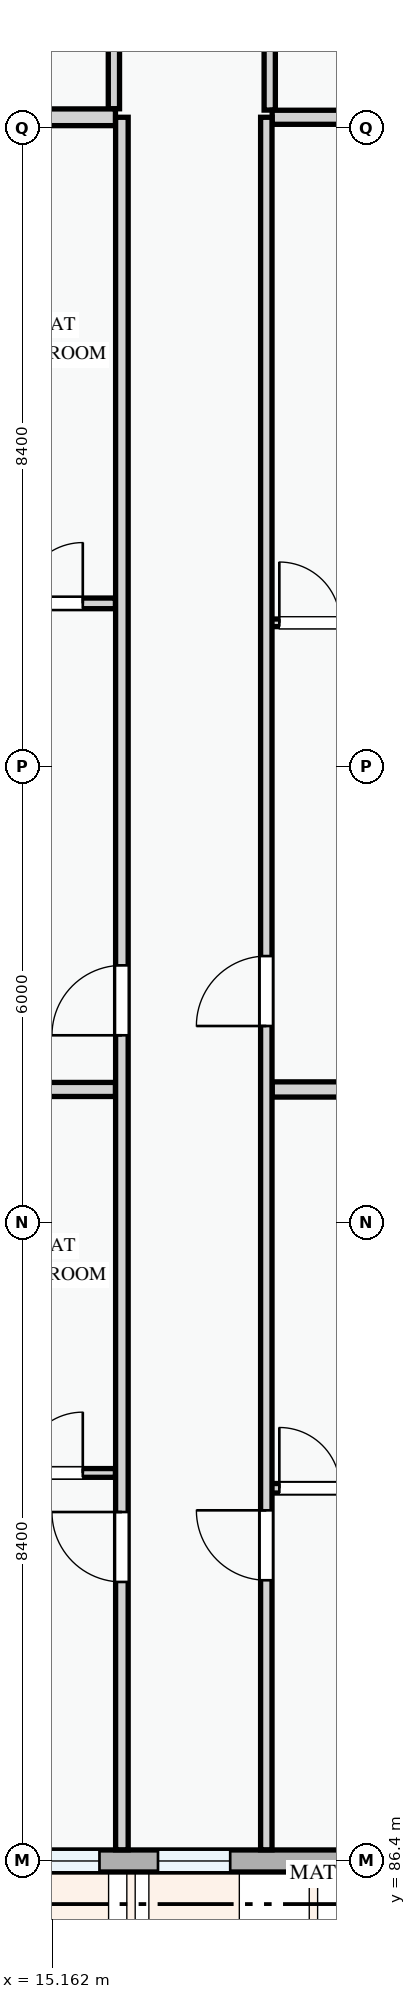
"""IFC4 building model, lengths in metres.
Left out: names, types, materials, properties, quantities, classifications, styles, units other than length and angle.
Written with IfcOpenShell. Run it as: python <this file> out.ifc"""

import sys

from ifc_helpers import new_model, si_unit, direction, frame, frame_2d, origin, place, context, subcontext, project, spatial, rectangle, extrude, element, fill, save


model = new_model("IFC4")
c1 = context("Model", 3, precision=1e-05, world=origin(), true_north=direction((0.0, 1.0)))
c2 = subcontext(c1, "Body", "Model", "MODEL_VIEW")
j1 = project(units=[si_unit("LENGTHUNIT", "METRE"), si_unit("PLANEANGLEUNIT", "RADIAN")], contexts=[c1])
p1 = place(None, origin())
s1 = spatial("IfcSite", under=j1, at=p1, CompositionType="ELEMENT")
p2 = place(p1, origin())
s2 = spatial("IfcBuilding", under=s1, at=p2, CompositionType="ELEMENT")
p3 = place(p2, frame((0.0, 0.0, 27.9)))
s3 = spatial("IfcBuildingStorey", under=s2, at=p3, CompositionType="ELEMENT", Elevation=27.9)
p4 = place(p3, frame((14.4, 86.4, 0.0), z_axis=(0.0, 0.0, 1.0), x_axis=(1.0, 0.0, 0.0)))
e1 = element("IfcWall", 1, at=p4, inside=s3, PredefinedType="STANDARD", context=c2, shape_type="SweptSolid", body=[
    extrude(rectangle(XDim=8.4, YDim=0.29, at=frame_2d((4.2, 0.0))), origin(), (0.0, 0.0, 1.0), 2.375),
])
p5 = place(p4, frame((0.485, 0.0, 0.78)))
e2 = element("IfcOpeningElement", 2, at=p5, cuts=e1, PredefinedType="OPENING", context=c2, shape_type="SweptSolid", body=[
    extrude(rectangle(XDim=0.9, YDim=1.2, at=frame_2d((0.45, 0.6))), frame((0.0, 0.155, 0.0), z_axis=(0.0, -1.0, 0.0), x_axis=(1.0, 0.0, 0.0)), (0.0, 0.0, 1.0), 0.31),
])
p6 = place(p4, frame((2.155, 0.0, 0.78)))
e3 = element("IfcOpeningElement", 3, at=p6, cuts=e1, PredefinedType="OPENING", context=c2, shape_type="SweptSolid", body=[
    extrude(rectangle(XDim=0.95, YDim=1.15, at=frame_2d((0.475, 0.575))), frame((0.0, 0.155, 0.0), z_axis=(0.0, -1.0, 0.0), x_axis=(1.0, 0.0, 0.0)), (0.0, 0.0, 1.0), 0.31),
])
p7 = place(p4, frame((5.395, 0.0, 0.78)))
e4 = element("IfcOpeningElement", 4, at=p7, cuts=e1, PredefinedType="OPENING", context=c2, shape_type="SweptSolid", body=[
    extrude(rectangle(XDim=1.0, YDim=1.25, at=frame_2d((0.5, 0.625))), frame((0.0, 0.155, 0.0), z_axis=(0.0, -1.0, 0.0), x_axis=(1.0, 0.0, 0.0)), (0.0, 0.0, 1.0), 0.31),
])
p8 = place(p3, frame((15.975, 113.324, 0.0), z_axis=(0.0, 0.0, 1.0), x_axis=(0.0, -1.0, 0.0)))
e5 = element("IfcWall", 5, at=p8, inside=s3, PredefinedType="PARTITIONING", context=c2, shape_type="SweptSolid", body=[
    extrude(rectangle(XDim=3.872, YDim=0.148, at=frame_2d((1.936, 0.0))), origin(), (0.0, 0.0, 1.0), 3.0),
])
p9 = place(p3, frame((18.025, 113.324, 0.0), z_axis=(0.0, 0.0, 1.0), x_axis=(0.0, -1.0, 0.0)))
e6 = element("IfcWall", 6, at=p9, inside=s3, PredefinedType="PARTITIONING", context=c2, shape_type="SweptSolid", body=[
    extrude(rectangle(XDim=3.889, YDim=0.148, at=frame_2d((1.945, 0.0))), origin(), (0.0, 0.0, 1.0), 3.0),
])
p10 = place(p3, frame((8.547, 91.505, 0.0), z_axis=(0.0, 0.0, 1.0), x_axis=(1.0, 0.0, 0.0)))
e7 = element("IfcWall", 7, at=p10, inside=s3, PredefinedType="PARTITIONING", context=c2, shape_type="SweptSolid", body=[
    extrude(rectangle(XDim=7.448, YDim=0.115, at=frame_2d((3.724, 0.0))), origin(), (0.0, 0.0, 1.0), 3.0),
])
p11 = place(p10, frame((1.317, 0.0, 0.0)))
e8 = element("IfcOpeningElement", 8, at=p11, cuts=e7, PredefinedType="OPENING", context=c2, shape_type="SweptSolid", body=[
    extrude(rectangle(XDim=0.85, YDim=2.1, at=frame_2d((0.425, 1.05))), frame((0.0, 0.067, 0.0), z_axis=(0.0, -1.0, 0.0), x_axis=(1.0, 0.0, 0.0)), (0.0, 0.0, 1.0), 0.135),
])
p12 = place(p10, frame((4.212, 0.0, 0.0)))
e9 = element("IfcOpeningElement", 9, at=p12, cuts=e7, PredefinedType="OPENING", context=c2, shape_type="SweptSolid", body=[
    extrude(rectangle(XDim=0.85, YDim=2.1, at=frame_2d((0.425, 1.05))), frame((0.0, 0.067, 0.0), z_axis=(0.0, -1.0, 0.0), x_axis=(1.0, 0.0, 0.0)), (0.0, 0.0, 1.0), 0.135),
])
p13 = place(p10, frame((6.219, 0.0, 0.0)))
e10 = element("IfcOpeningElement", 10, at=p13, cuts=e7, PredefinedType="OPENING", context=c2, shape_type="SweptSolid", body=[
    extrude(rectangle(XDim=0.8, YDim=2.1, at=frame_2d((0.4, 1.05))), frame((0.0, 0.067, 0.0), z_axis=(0.0, -1.0, 0.0), x_axis=(1.0, 0.0, 0.0)), (0.0, 0.0, 1.0), 0.135),
])
p14 = place(p3, frame((17.98, 91.303, 0.0), z_axis=(0.0, 0.0, 1.0), x_axis=(1.0, 0.0, 0.0)))
e11 = element("IfcWall", 11, at=p14, inside=s3, PredefinedType="PARTITIONING", context=c2, shape_type="SweptSolid", body=[
    extrude(rectangle(XDim=4.673, YDim=0.125, at=frame_2d((2.336, 0.0))), origin(), (0.0, 0.0, 1.0), 3.0),
])
p15 = place(p14, frame((0.171, 0.0, 0.0)))
e12 = element("IfcOpeningElement", 12, at=p15, cuts=e11, PredefinedType="OPENING", context=c2, shape_type="SweptSolid", body=[
    extrude(rectangle(XDim=0.8, YDim=2.1, at=frame_2d((0.4, 1.05))), frame((0.0, 0.073, 0.0), z_axis=(0.0, -1.0, 0.0), x_axis=(1.0, 0.0, 0.0)), (0.0, 0.0, 1.0), 0.145),
])
p16 = place(p14, frame((1.384, 0.0, 0.0)))
e13 = element("IfcOpeningElement", 13, at=p16, cuts=e11, PredefinedType="OPENING", context=c2, shape_type="SweptSolid", body=[
    extrude(rectangle(XDim=0.85, YDim=2.1, at=frame_2d((0.425, 1.05))), frame((0.0, 0.073, 0.0), z_axis=(0.0, -1.0, 0.0), x_axis=(1.0, 0.0, 0.0)), (0.0, 0.0, 1.0), 0.145),
])
p17 = place(p14, frame((3.193, 0.0, 0.0)))
e14 = element("IfcOpeningElement", 14, at=p17, cuts=e11, PredefinedType="OPENING", context=c2, shape_type="SweptSolid", body=[
    extrude(rectangle(XDim=0.85, YDim=2.1, at=frame_2d((0.425, 1.05))), frame((0.0, 0.073, 0.0), z_axis=(0.0, -1.0, 0.0), x_axis=(1.0, 0.0, 0.0)), (0.0, 0.0, 1.0), 0.145),
])
p18 = place(p3, frame((8.547, 102.945, 0.0), z_axis=(0.0, 0.0, 1.0), x_axis=(1.0, 0.0, 0.0)))
e15 = element("IfcWall", 15, at=p18, inside=s3, PredefinedType="PARTITIONING", context=c2, shape_type="SweptSolid", body=[
    extrude(rectangle(XDim=7.448, YDim=0.14, at=frame_2d((3.724, 0.0))), origin(), (0.0, 0.0, 1.0), 3.0),
])
p19 = place(p18, frame((1.317, 0.0, 0.0)))
e16 = element("IfcOpeningElement", 16, at=p19, cuts=e15, PredefinedType="OPENING", context=c2, shape_type="SweptSolid", body=[
    extrude(rectangle(XDim=0.85, YDim=2.1, at=frame_2d((0.425, 1.05))), frame((0.0, 0.08, 0.0), z_axis=(0.0, -1.0, 0.0), x_axis=(1.0, 0.0, 0.0)), (0.0, 0.0, 1.0), 0.16),
])
p20 = place(p18, frame((4.212, 0.0, 0.0)))
e17 = element("IfcOpeningElement", 17, at=p20, cuts=e15, PredefinedType="OPENING", context=c2, shape_type="SweptSolid", body=[
    extrude(rectangle(XDim=0.82, YDim=2.08, at=frame_2d((0.41, 1.04))), frame((0.0, 0.08, 0.0), z_axis=(0.0, -1.0, 0.0), x_axis=(1.0, 0.0, 0.0)), (0.0, 0.0, 1.0), 0.16),
])
p21 = place(p18, frame((6.219, 0.0, 0.0)))
e18 = element("IfcOpeningElement", 18, at=p21, cuts=e15, PredefinedType="OPENING", context=c2, shape_type="SweptSolid", body=[
    extrude(rectangle(XDim=0.8, YDim=2.1, at=frame_2d((0.4, 1.05))), frame((0.0, 0.08, 0.0), z_axis=(0.0, -1.0, 0.0), x_axis=(1.0, 0.0, 0.0)), (0.0, 0.0, 1.0), 0.16),
])
p22 = place(p3, frame((17.98, 102.689, 0.0), z_axis=(0.0, 0.0, 1.0), x_axis=(1.0, 0.0, 0.0)))
e19 = element("IfcWall", 19, at=p22, inside=s3, PredefinedType="PARTITIONING", context=c2, shape_type="SweptSolid", body=[
    extrude(rectangle(XDim=4.673, YDim=0.1, at=frame_2d((2.336, 0.0))), origin(), (0.0, 0.0, 1.0), 3.0),
])
p23 = place(p22, frame((0.171, 0.0, 0.0)))
e20 = element("IfcOpeningElement", 20, at=p23, cuts=e19, PredefinedType="OPENING", context=c2, shape_type="SweptSolid", body=[
    extrude(rectangle(XDim=0.8, YDim=2.1, at=frame_2d((0.4, 1.05))), frame((0.0, 0.06, 0.0), z_axis=(0.0, -1.0, 0.0), x_axis=(1.0, 0.0, 0.0)), (0.0, 0.0, 1.0), 0.12),
])
p24 = place(p22, frame((1.384, 0.0, 0.0)))
e21 = element("IfcOpeningElement", 21, at=p24, cuts=e19, PredefinedType="OPENING", context=c2, shape_type="SweptSolid", body=[
    extrude(rectangle(XDim=0.85, YDim=2.1, at=frame_2d((0.425, 1.05))), frame((0.0, 0.06, 0.0), z_axis=(0.0, -1.0, 0.0), x_axis=(1.0, 0.0, 0.0)), (0.0, 0.0, 1.0), 0.12),
])
p25 = place(p22, frame((3.193, 0.0, 0.0)))
e22 = element("IfcOpeningElement", 22, at=p25, cuts=e19, PredefinedType="OPENING", context=c2, shape_type="SweptSolid", body=[
    extrude(rectangle(XDim=0.82, YDim=2.08, at=frame_2d((0.41, 1.04))), frame((0.0, 0.06, 0.0), z_axis=(0.0, -1.0, 0.0), x_axis=(1.0, 0.0, 0.0)), (0.0, 0.0, 1.0), 0.12),
])
p26 = place(p3, frame((8.547, 96.55, 0.0), z_axis=(0.0, 0.0, 1.0), x_axis=(1.0, 0.0, 0.0)))
e23 = element("IfcWall", 23, at=p26, inside=s3, PredefinedType="PARTITIONING", context=c2, shape_type="SweptSolid", body=[
    extrude(rectangle(XDim=7.448, YDim=0.185, at=frame_2d((3.724, 0.0))), origin(), (0.0, 0.0, 1.0), 3.0),
])
p27 = place(p3, frame((18.057, 96.55, 0.0), z_axis=(0.0, 0.0, 1.0), x_axis=(1.0, 0.0, 0.0)))
e24 = element("IfcWall", 24, at=p27, inside=s3, PredefinedType="PARTITIONING", context=c2, shape_type="SweptSolid", body=[
    extrude(rectangle(XDim=4.596, YDim=0.2, at=frame_2d((2.298, 0.0))), origin(), (0.0, 0.0, 1.0), 3.0),
])
p28 = place(p3, frame((8.547, 109.34, 0.0), z_axis=(0.0, 0.0, 1.0), x_axis=(1.0, 0.0, 0.0)))
e25 = element("IfcWall", 25, at=p28, inside=s3, PredefinedType="PARTITIONING", context=c2, shape_type="SweptSolid", body=[
    extrude(rectangle(XDim=7.448, YDim=0.22, at=frame_2d((3.724, 0.0))), origin(), (0.0, 0.0, 1.0), 2.375),
])
p29 = place(p3, frame((18.057, 109.34, 0.0), z_axis=(0.0, 0.0, 1.0), x_axis=(1.0, 0.0, 0.0)))
e26 = element("IfcWall", 26, at=p29, inside=s3, PredefinedType="PARTITIONING", context=c2, shape_type="SweptSolid", body=[
    extrude(rectangle(XDim=4.683, YDim=0.185, at=frame_2d((2.342, 0.0))), origin(), (0.0, 0.0, 1.0), 2.375),
])
p30 = place(p3, frame((16.08, 86.547, 0.0), z_axis=(0.0, 0.0, 1.0), x_axis=(0.0, 1.0, 0.0)))
e27 = element("IfcWall", 27, at=p30, inside=s3, PredefinedType="PARTITIONING", context=c2, shape_type="SweptSolid", body=[
    extrude(rectangle(XDim=22.793, YDim=0.165, at=frame_2d((11.396, 0.0))), origin(), (0.0, 0.0, 1.0), 3.0),
])
p31 = place(p30, frame((3.524, 0.0, 0.0)))
e28 = element("IfcOpeningElement", 28, at=p31, cuts=e27, PredefinedType="OPENING", context=c2, shape_type="SweptSolid", body=[
    extrude(rectangle(XDim=0.92, YDim=2.1, at=frame_2d((0.46, 1.05))), frame((0.0, 0.093, 0.0), z_axis=(0.0, -1.0, 0.0), x_axis=(1.0, 0.0, 0.0)), (0.0, 0.0, 1.0), 0.185),
])
p32 = place(p30, frame((10.716, 0.0, 0.0)))
e29 = element("IfcOpeningElement", 29, at=p32, cuts=e27, PredefinedType="OPENING", context=c2, shape_type="SweptSolid", body=[
    extrude(rectangle(XDim=0.92, YDim=2.1, at=frame_2d((0.46, 1.05))), frame((0.0, 0.093, 0.0), z_axis=(0.0, -1.0, 0.0), x_axis=(1.0, 0.0, 0.0)), (0.0, 0.0, 1.0), 0.185),
])
p33 = place(p3, frame((17.98, 86.547, 0.0), z_axis=(0.0, 0.0, 1.0), x_axis=(0.0, 1.0, 0.0)))
e30 = element("IfcWall", 30, at=p33, inside=s3, PredefinedType="PARTITIONING", context=c2, shape_type="SweptSolid", body=[
    extrude(rectangle(XDim=22.793, YDim=0.15, at=frame_2d((11.396, 0.0))), origin(), (0.0, 0.0, 1.0), 3.0),
])
p34 = place(p33, frame((3.546, 0.0, 0.0)))
e31 = element("IfcOpeningElement", 31, at=p34, cuts=e30, PredefinedType="OPENING", context=c2, shape_type="SweptSolid", body=[
    extrude(rectangle(XDim=0.92, YDim=2.1, at=frame_2d((0.46, 1.05))), frame((0.0, 0.085, 0.0), z_axis=(0.0, -1.0, 0.0), x_axis=(1.0, 0.0, 0.0)), (0.0, 0.0, 1.0), 0.17),
])
p35 = place(p33, frame((10.838, 0.0, 0.0)))
e32 = element("IfcOpeningElement", 32, at=p35, cuts=e30, PredefinedType="OPENING", context=c2, shape_type="SweptSolid", body=[
    extrude(rectangle(XDim=0.92, YDim=2.1, at=frame_2d((0.46, 1.05))), frame((0.0, 0.085, 0.0), z_axis=(0.0, -1.0, 0.0), x_axis=(1.0, 0.0, 0.0)), (0.0, 0.0, 1.0), 0.17),
])
p36 = place(p5, origin())
e33 = element("IfcWindow", 33, at=p36, inside=s3, PartitioningType="SINGLE_PANEL", PredefinedType="WINDOW", context=c2, shape_type="SweptSolid", body=[
    extrude(rectangle(XDim=0.9, YDim=1.2, at=frame_2d((0.45, 0.6))), frame((0.0, 0.03, 0.0), z_axis=(0.0, -1.0, 0.0), x_axis=(1.0, 0.0, 0.0)), (0.0, 0.0, 1.0), 0.06),
])
fill(e2, e33)
p37 = place(p6, origin())
e34 = element("IfcWindow", 34, at=p37, inside=s3, PartitioningType="SINGLE_PANEL", PredefinedType="WINDOW", context=c2, shape_type="SweptSolid", body=[
    extrude(rectangle(XDim=0.95, YDim=1.15, at=frame_2d((0.475, 0.575))), frame((0.0, 0.03, 0.0), z_axis=(0.0, -1.0, 0.0), x_axis=(1.0, 0.0, 0.0)), (0.0, 0.0, 1.0), 0.06),
])
fill(e3, e34)
p38 = place(p13, origin())
e35 = element("IfcDoor", 35, at=p38, inside=s3, OperationType="SINGLE_SWING_RIGHT", PredefinedType="DOOR", context=c2, shape_type="SweptSolid", body=[
    extrude(rectangle(XDim=0.8, YDim=2.1, at=frame_2d((0.4, 1.05))), frame((0.0, 0.025, 0.0), z_axis=(0.0, -1.0, 0.0), x_axis=(1.0, 0.0, 0.0)), (0.0, 0.0, 1.0), 0.05),
])
fill(e10, e35)
p39 = place(p15, origin())
e36 = element("IfcDoor", 36, at=p39, inside=s3, OperationType="SINGLE_SWING_LEFT", PredefinedType="DOOR", context=c2, shape_type="SweptSolid", body=[
    extrude(rectangle(XDim=0.8, YDim=2.1, at=frame_2d((0.4, 1.05))), frame((0.0, 0.025, 0.0), z_axis=(0.0, -1.0, 0.0), x_axis=(1.0, 0.0, 0.0)), (0.0, 0.0, 1.0), 0.05),
])
fill(e12, e36)
p40 = place(p21, origin())
e37 = element("IfcDoor", 37, at=p40, inside=s3, OperationType="SINGLE_SWING_RIGHT", PredefinedType="DOOR", context=c2, shape_type="SweptSolid", body=[
    extrude(rectangle(XDim=0.8, YDim=2.1, at=frame_2d((0.4, 1.05))), frame((0.0, 0.025, 0.0), z_axis=(0.0, -1.0, 0.0), x_axis=(1.0, 0.0, 0.0)), (0.0, 0.0, 1.0), 0.05),
])
fill(e18, e37)
p41 = place(p23, origin())
e38 = element("IfcDoor", 38, at=p41, inside=s3, OperationType="SINGLE_SWING_LEFT", PredefinedType="DOOR", context=c2, shape_type="SweptSolid", body=[
    extrude(rectangle(XDim=0.8, YDim=2.1, at=frame_2d((0.4, 1.05))), frame((0.0, 0.025, 0.0), z_axis=(0.0, -1.0, 0.0), x_axis=(1.0, 0.0, 0.0)), (0.0, 0.0, 1.0), 0.05),
])
fill(e20, e38)
p42 = place(p31, origin())
e39 = element("IfcDoor", 39, at=p42, inside=s3, OperationType="SINGLE_SWING_RIGHT", PredefinedType="DOOR", context=c2, shape_type="SweptSolid", body=[
    extrude(rectangle(XDim=0.92, YDim=2.1, at=frame_2d((0.46, 1.05))), frame((0.0, 0.025, 0.0), z_axis=(0.0, -1.0, 0.0), x_axis=(1.0, 0.0, 0.0)), (0.0, 0.0, 1.0), 0.05),
])
fill(e28, e39)
p43 = place(p32, origin())
e40 = element("IfcDoor", 40, at=p43, inside=s3, OperationType="SINGLE_SWING_LEFT", PredefinedType="DOOR", context=c2, shape_type="SweptSolid", body=[
    extrude(rectangle(XDim=0.92, YDim=2.1, at=frame_2d((0.46, 1.05))), frame((0.0, 0.025, 0.0), z_axis=(0.0, -1.0, 0.0), x_axis=(1.0, 0.0, 0.0)), (0.0, 0.0, 1.0), 0.05),
])
fill(e29, e40)
p44 = place(p34, origin())
e41 = element("IfcDoor", 41, at=p44, inside=s3, OperationType="SINGLE_SWING_RIGHT", PredefinedType="DOOR", context=c2, shape_type="SweptSolid", body=[
    extrude(rectangle(XDim=0.92, YDim=2.1, at=frame_2d((0.46, 1.05))), frame((0.0, 0.025, 0.0), z_axis=(0.0, -1.0, 0.0), x_axis=(1.0, 0.0, 0.0)), (0.0, 0.0, 1.0), 0.05),
])
fill(e31, e41)
p45 = place(p35, origin())
e42 = element("IfcDoor", 42, at=p45, inside=s3, OperationType="SINGLE_SWING_LEFT", PredefinedType="DOOR", context=c2, shape_type="SweptSolid", body=[
    extrude(rectangle(XDim=0.92, YDim=2.1, at=frame_2d((0.46, 1.05))), frame((0.0, 0.025, 0.0), z_axis=(0.0, -1.0, 0.0), x_axis=(1.0, 0.0, 0.0)), (0.0, 0.0, 1.0), 0.05),
])
fill(e32, e42)
save(model, sys.argv[1])
